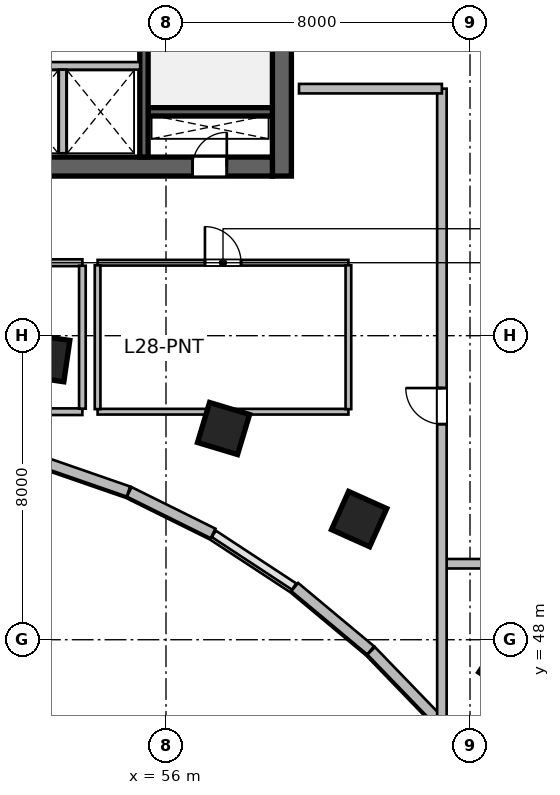
"""IFC4 building model, lengths in metres.
Left out: names, types, materials, properties, quantities, classifications, styles, units other than length and angle.
Written with IfcOpenShell. Run it as: python <this file> out.ifc"""

import sys

from ifc_helpers import new_model, si_unit, direction, frame, frame_2d, origin, origin_2d, place, context, subcontext, project, spatial, rectangle, extrude, source, transform, mapped, element, fill, save


model = new_model("IFC4")
c1 = context("Model", 3, precision=1e-05, world=origin(), true_north=direction((0.0, 1.0)))
c2 = subcontext(c1, "Body", "Model", "MODEL_VIEW")
j1 = project(units=[si_unit("LENGTHUNIT", "METRE"), si_unit("PLANEANGLEUNIT", "RADIAN")], contexts=[c1])
p1 = place(None, origin())
s1 = spatial("IfcSite", under=j1, at=p1, CompositionType="ELEMENT")
p2 = place(p1, origin())
s2 = spatial("IfcBuilding", under=s1, at=p2, CompositionType="ELEMENT")
p3 = place(p2, frame((0.0, 0.0, 119.4)))
s3 = spatial("IfcBuildingStorey", under=s2, at=p3, CompositionType="ELEMENT", Elevation=119.4)
m1 = source(origin(), c2, "Body", "SweptSolid", [
    extrude(rectangle(XDim=12.0, YDim=0.5, at=frame_2d((6.0, 0.0))), origin(), (0.0, 0.0, 1.0), 3.9),
])
p4 = place(p3, frame((59.05, 60.2, 0.0), z_axis=(0.0, 0.0, 1.0), x_axis=(0.0, 1.0, 0.0)))
e1 = element("IfcWall", 1, at=p4, inside=s3, PredefinedType="SHEAR", context=c2, shape_type="MappedRepresentation", body=[
    mapped(m1, transform((0.0, 0.0, 0.0), scale=1.0)),
])
m2 = source(origin(), c2, "Body", "SweptSolid", [
    extrude(rectangle(XDim=21.6, YDim=0.5, at=frame_2d((10.8, 0.0))), origin(), (0.0, 0.0, 1.0), 3.9),
])
p5 = place(p3, frame((37.2, 60.45, 0.0), z_axis=(0.0, 0.0, 1.0), x_axis=(1.0, 0.0, 0.0)))
e2 = element("IfcWall", 2, at=p5, inside=s3, PredefinedType="SHEAR", context=c2, shape_type="MappedRepresentation", body=[
    mapped(m2, transform((0.0, 0.0, 0.0), scale=1.0)),
])
p6 = place(p5, frame((1.1, 0.0, 0.0)))
e3 = element("IfcOpeningElement", 3, at=p6, cuts=e2, PredefinedType="OPENING", context=c2, shape_type="SweptSolid", body=[
    extrude(rectangle(XDim=1.15, YDim=2.15, at=frame_2d((0.575, 1.075))), frame((0.0, 0.26, 0.0), z_axis=(0.0, -1.0, 0.0), x_axis=(1.0, 0.0, 0.0)), (0.0, 0.0, 1.0), 0.52),
])
p7 = place(p5, frame((19.5, 0.0, 0.0)))
e4 = element("IfcOpeningElement", 4, at=p7, cuts=e2, PredefinedType="OPENING", context=c2, shape_type="SweptSolid", body=[
    extrude(rectangle(XDim=0.9, YDim=2.1, at=frame_2d((0.45, 1.05))), frame((0.0, 0.26, 0.0), z_axis=(0.0, -1.0, 0.0), x_axis=(1.0, 0.0, 0.0)), (0.0, 0.0, 1.0), 0.52),
])
p8 = place(p5, frame((12.02, 0.0, 0.0)))
e5 = element("IfcOpeningElement", 5, at=p8, cuts=e2, PredefinedType="OPENING", context=c2, shape_type="SweptSolid", body=[
    extrude(rectangle(XDim=1.6, YDim=2.15, at=frame_2d((0.8, 1.075))), frame((0.0, 0.26, 0.0), z_axis=(0.0, -1.0, 0.0), x_axis=(1.0, 0.0, 0.0)), (0.0, 0.0, 1.0), 0.52),
])
m3 = source(origin(), c2, "Body", "SweptSolid", [
    extrude(rectangle(XDim=3.27, YDim=0.22, at=frame_2d((1.635, 0.0))), origin(), (0.0, 0.0, 1.0), 3.9),
])
p9 = place(p3, frame((55.53, 61.89, 0.0), z_axis=(0.0, 0.0, 1.0), x_axis=(1.0, 0.0, 0.0)))
e6 = element("IfcWall", 6, at=p9, inside=s3, PredefinedType="SHEAR", context=c2, shape_type="MappedRepresentation", body=[
    mapped(m3, transform((0.0, 0.0, 0.0), scale=1.0)),
])
m4 = source(origin(), c2, "Body", "SweptSolid", [
    extrude(rectangle(XDim=11.0, YDim=0.22, at=frame_2d((5.5, 0.0))), origin(), (0.0, 0.0, 1.0), 3.9),
])
p10 = place(p3, frame((55.42, 60.7, 0.0), z_axis=(0.0, 0.0, 1.0), x_axis=(0.0, 1.0, 0.0)))
e7 = element("IfcWall", 7, at=p10, inside=s3, PredefinedType="SHEAR", context=c2, shape_type="MappedRepresentation", body=[
    mapped(m4, transform((0.0, 0.0, 0.0), scale=1.0)),
])
p11 = place(p10, frame((9.545, 0.0, 0.0)))
e8 = element("IfcOpeningElement", 8, at=p11, cuts=e7, PredefinedType="OPENING", context=c2, shape_type="SweptSolid", body=[
    extrude(rectangle(XDim=1.15, YDim=2.15, at=frame_2d((0.575, 1.075))), frame((0.0, 0.12, 0.0), z_axis=(0.0, -1.0, 0.0), x_axis=(1.0, 0.0, 0.0)), (0.0, 0.0, 1.0), 0.24),
])
m5 = source(origin(), c2, "Body", "SweptSolid", [
    extrude(rectangle(XDim=1.1, YDim=1.1, at=origin_2d()), origin(), (0.0, 0.0, 1.0), 3.9),
])
for number, where, z_axis, x_axis in (
    (9, (52.846, 55.411, 0.0), (0.0, 0.0, 1.0), (0.143, 0.99, 0.0)),
    (10, (57.515, 53.558, 0.0), (0.0, 0.0, 1.0), (0.289, 0.957, 0.0)),
    (11, (61.082, 51.175, 0.0), (0.0, 0.0, 1.0), (0.409, 0.912, 0.0)),
    (12, (64.996, 47.294, 0.0), (0.0, 0.0, 1.0), (0.558, 0.83, 0.0)),
):
    element("IfcColumn", number, at=place(p3, frame(where, z_axis=z_axis, x_axis=x_axis)), inside=s3, PredefinedType="COLUMN", context=c2, shape_type="MappedRepresentation", body=[
        mapped(m5, transform((0.0, 0.0, 0.0), scale=1.0)),
    ])
m6 = source(origin(), c2, "Body", "SweptSolid", [
    extrude(rectangle(XDim=2.68, YDim=0.28, at=frame_2d((1.34, 0.0))), origin(), (0.0, 0.0, 1.0), 3.65),
])
p12 = place(p3, frame((63.26, 45.78, 0.0), z_axis=(0.0, 0.0, 1.0), x_axis=(-0.694561996568, 0.719432855049, 0.0)))
e13 = element("IfcWall", 13, at=p12, inside=s3, PredefinedType="SOLIDWALL", context=c2, shape_type="MappedRepresentation", body=[
    mapped(m6, transform((0.0, 0.0, 0.0), scale=1.0)),
])
m7 = source(origin(), c2, "Body", "SweptSolid", [
    extrude(rectangle(XDim=2.601, YDim=0.28, at=frame_2d((1.3, 0.0))), origin(), (0.0, 0.0, 1.0), 3.65),
])
p13 = place(p3, frame((61.385, 47.721, 0.0), z_axis=(0.0, 0.0, 1.0), x_axis=(-0.76796730295, 0.640489048775, 0.0)))
e14 = element("IfcWall", 14, at=p13, inside=s3, PredefinedType="SOLIDWALL", context=c2, shape_type="MappedRepresentation", body=[
    mapped(m7, transform((0.0, 0.0, 0.0), scale=1.0)),
])
m8 = source(origin(), c2, "Body", "SweptSolid", [
    extrude(rectangle(XDim=2.462, YDim=0.28, at=frame_2d((1.231, 0.0))), origin(), (0.0, 0.0, 1.0), 3.65),
])
p14 = place(p3, frame((57.239, 50.797, 0.0), z_axis=(0.0, 0.0, 1.0), x_axis=(-0.8959882207, 0.444077817917, 0.0)))
e15 = element("IfcWall", 15, at=p14, inside=s3, PredefinedType="SOLIDWALL", context=c2, shape_type="MappedRepresentation", body=[
    mapped(m8, transform((0.0, 0.0, 0.0), scale=1.0)),
])
m9 = source(origin(), c2, "Body", "SweptSolid", [
    extrude(rectangle(XDim=2.411, YDim=0.28, at=frame_2d((1.205, 0.0))), origin(), (0.0, 0.0, 1.0), 3.65),
])
p15 = place(p3, frame((55.012, 51.899, 0.0), z_axis=(0.0, 0.0, 1.0), x_axis=(-0.944880068161, 0.327416640982, 0.0)))
e16 = element("IfcWall", 16, at=p15, inside=s3, PredefinedType="SOLIDWALL", context=c2, shape_type="MappedRepresentation", body=[
    mapped(m9, transform((0.0, 0.0, 0.0), scale=1.0)),
])
m10 = source(origin(), c2, "Body", "SweptSolid", [
    extrude(rectangle(XDim=4.1, YDim=0.2, at=frame_2d((2.05, 0.0))), origin(), (0.0, 0.0, 1.0), 3.65),
])
p16 = place(p3, frame((51.22, 63.1, 0.0), z_axis=(0.0, 0.0, 1.0), x_axis=(1.0, 0.0, 0.0)))
e17 = element("IfcWall", 17, at=p16, inside=s3, PredefinedType="SOLIDWALL", context=c2, shape_type="MappedRepresentation", body=[
    mapped(m10, transform((0.0, 0.0, 0.0), scale=1.0)),
])
m11 = source(origin(), c2, "Body", "SweptSolid", [
    extrude(rectangle(XDim=2.2, YDim=0.2, at=frame_2d((1.1, 0.0))), origin(), (0.0, 0.0, 1.0), 3.65),
])
p17 = place(p3, frame((53.28, 60.8, 0.0), z_axis=(0.0, 0.0, 1.0), x_axis=(0.0, 1.0, 0.0)))
e18 = element("IfcWall", 18, at=p17, inside=s3, PredefinedType="SOLIDWALL", context=c2, shape_type="MappedRepresentation", body=[
    mapped(m11, transform((0.0, 0.0, 0.0), scale=1.0)),
])
m12 = source(origin(), c2, "Body", "SweptSolid", [
    extrude(rectangle(XDim=3.248, YDim=0.175, at=frame_2d((1.624, 0.0))), origin(), (0.0, 0.0, 1.0), 3.65),
])
p18 = place(p3, frame((50.552, 54.0, 0.0), z_axis=(0.0, 0.0, 1.0), x_axis=(1.0, 0.0, 0.0)))
e19 = element("IfcWall", 19, at=p18, inside=s3, PredefinedType="PARTITIONING", context=c2, shape_type="MappedRepresentation", body=[
    mapped(m12, transform((0.0, 0.0, 0.0), scale=1.0)),
])
m13 = source(origin(), c2, "Body", "SweptSolid", [
    extrude(rectangle(XDim=3.248, YDim=0.18, at=frame_2d((1.624, 0.0))), origin(), (0.0, 0.0, 1.0), 3.65),
])
p19 = place(p3, frame((50.552, 57.92, 0.0), z_axis=(0.0, 0.0, 1.0), x_axis=(1.0, 0.0, 0.0)))
e20 = element("IfcWall", 20, at=p19, inside=s3, PredefinedType="PLUMBINGWALL", context=c2, shape_type="MappedRepresentation", body=[
    mapped(m13, transform((0.0, 0.0, 0.0), scale=1.0)),
])
p20 = place(p19, frame((1.149, 0.0, 0.0)))
e21 = element("IfcOpeningElement", 21, at=p20, cuts=e20, PredefinedType="OPENING", context=c2, shape_type="SweptSolid", body=[
    extrude(rectangle(XDim=0.95, YDim=2.12, at=frame_2d((0.475, 1.06))), frame((0.0, 0.1, 0.0), z_axis=(0.0, -1.0, 0.0), x_axis=(1.0, 0.0, 0.0)), (0.0, 0.0, 1.0), 0.2),
])
m14 = source(origin(), c2, "Body", "SweptSolid", [
    extrude(rectangle(XDim=3.763, YDim=0.175, at=frame_2d((1.881, 0.0))), origin(), (0.0, 0.0, 1.0), 3.65),
])
p21 = place(p3, frame((53.8, 54.079, 0.0), z_axis=(0.0, 0.0, 1.0), x_axis=(0.0, 1.0, 0.0)))
e22 = element("IfcWall", 22, at=p21, inside=s3, PredefinedType="PARTITIONING", context=c2, shape_type="MappedRepresentation", body=[
    mapped(m14, transform((0.0, 0.0, 0.0), scale=1.0)),
])
m15 = source(origin(), c2, "Body", "SweptSolid", [
    extrude(rectangle(XDim=6.6, YDim=0.15, at=frame_2d((3.3, 0.0))), origin(), (0.0, 0.0, 1.0), 3.095),
])
p22 = place(p3, frame((54.2, 54.0, 0.0), z_axis=(0.0, 0.0, 1.0), x_axis=(1.0, 0.0, 0.0)))
e23 = element("IfcWall", 23, at=p22, inside=s3, PredefinedType="PARTITIONING", context=c2, shape_type="MappedRepresentation", body=[
    mapped(m15, transform((0.0, 0.0, 0.0), scale=1.0)),
])
m16 = source(origin(), c2, "Body", "SweptSolid", [
    extrude(rectangle(XDim=6.6, YDim=0.15, at=frame_2d((3.3, 0.0))), origin(), (0.0, 0.0, 1.0), 3.65),
])
p23 = place(p3, frame((54.2, 57.92, 0.0), z_axis=(0.0, 0.0, 1.0), x_axis=(1.0, 0.0, 0.0)))
e24 = element("IfcWall", 24, at=p23, inside=s3, PredefinedType="PARTITIONING", context=c2, shape_type="MappedRepresentation", body=[
    mapped(m16, transform((0.0, 0.0, 0.0), scale=1.0)),
])
p24 = place(p23, frame((2.825, 0.0, 0.0)))
e25 = element("IfcOpeningElement", 25, at=p24, cuts=e24, PredefinedType="OPENING", context=c2, shape_type="SweptSolid", body=[
    extrude(rectangle(XDim=0.95, YDim=2.1, at=frame_2d((0.475, 1.05))), frame((0.0, 0.085, 0.0), z_axis=(0.0, -1.0, 0.0), x_axis=(1.0, 0.0, 0.0)), (0.0, 0.0, 1.0), 0.17),
])
m17 = source(origin(), c2, "Body", "SweptSolid", [
    extrude(rectangle(XDim=3.785, YDim=0.15, at=frame_2d((1.893, 0.0))), origin(), (0.0, 0.0, 1.0), 3.65),
])
for number, where, z_axis, x_axis in (
    (26, (54.2, 54.067, 0.0), (0.0, 0.0, 1.0), (0.0, 1.0, 0.0)),
    (27, (60.8, 54.067, 0.0), (0.0, 0.0, 1.0), (0.0, 1.0, 0.0)),
):
    element("IfcWall", number, at=place(p3, frame(where, z_axis=z_axis, x_axis=x_axis)), inside=s3, PredefinedType="PARTITIONING", context=c2, shape_type="MappedRepresentation", body=[
        mapped(m17, transform((0.0, 0.0, 0.0), scale=1.0)),
    ])
m18 = source(origin(), c2, "Body", "SweptSolid", [
    extrude(rectangle(XDim=2.5, YDim=0.25, at=frame_2d((1.25, 0.0))), origin(), (0.0, 0.0, 1.0), 3.65),
])
p25 = place(p3, frame((63.3, 50.0, 0.0), z_axis=(0.0, 0.0, 1.0), x_axis=(1.0, 0.0, 0.0)))
e28 = element("IfcWall", 28, at=p25, inside=s3, PredefinedType="PARTITIONING", context=c2, shape_type="MappedRepresentation", body=[
    mapped(m18, transform((0.0, 0.0, 0.0), scale=1.0)),
])
m19 = source(origin(), c2, "Body", "SweptSolid", [
    extrude(rectangle(XDim=16.706, YDim=0.25, at=frame_2d((8.353, 0.0))), origin(), (0.0, 0.0, 1.0), 2.942),
])
p26 = place(p3, frame((63.26, 45.794, 0.0), z_axis=(0.0, 0.0, 1.0), x_axis=(0.0, 1.0, 0.0)))
e29 = element("IfcWall", 29, at=p26, inside=s3, PredefinedType="PARTITIONING", context=c2, shape_type="MappedRepresentation", body=[
    mapped(m19, transform((0.0, 0.0, 0.0), scale=1.0)),
])
p27 = place(p26, frame((7.878, 0.0, 0.0)))
e30 = element("IfcOpeningElement", 30, at=p27, cuts=e29, PredefinedType="OPENING", context=c2, shape_type="SweptSolid", body=[
    extrude(rectangle(XDim=0.95, YDim=2.1, at=frame_2d((0.475, 1.05))), frame((0.0, 0.135, 0.0), z_axis=(0.0, -1.0, 0.0), x_axis=(1.0, 0.0, 0.0)), (0.0, 0.0, 1.0), 0.27),
])
m20 = source(origin(), c2, "Body", "SweptSolid", [
    extrude(rectangle(XDim=3.76, YDim=0.25, at=frame_2d((1.88, 0.0))), origin(), (0.0, 0.0, 1.0), 3.65),
])
p28 = place(p3, frame((59.5, 62.5, 0.0), z_axis=(0.0, 0.0, 1.0), x_axis=(1.0, 0.0, 0.0)))
e31 = element("IfcWall", 31, at=p28, inside=s3, PredefinedType="PARTITIONING", context=c2, shape_type="MappedRepresentation", body=[
    mapped(m20, transform((0.0, 0.0, 0.0), scale=1.0)),
])
m21 = source(origin(), c2, "Body", "SweptSolid", [
    extrude(rectangle(XDim=0.9, YDim=2.1, at=frame_2d((0.45, 1.05))), frame((0.0, 0.025, 0.0), z_axis=(0.0, -1.0, 0.0), x_axis=(1.0, 0.0, 0.0)), (0.0, 0.0, 1.0), 0.05),
])
p29 = place(p7, origin())
e32 = element("IfcDoor", 32, at=p29, inside=s3, OperationType="SINGLE_SWING_RIGHT", PredefinedType="DOOR", context=c2, shape_type="MappedRepresentation", body=[
    mapped(m21, transform((0.0, 0.0, 0.0), scale=1.0)),
])
fill(e4, e32)
m22 = source(origin(), c2, "Body", "SweptSolid", [
    extrude(rectangle(XDim=0.95, YDim=2.1, at=frame_2d((0.475, 1.05))), frame((0.0, 0.025, 0.0), z_axis=(0.0, -1.0, 0.0), x_axis=(1.0, 0.0, 0.0)), (0.0, 0.0, 1.0), 0.05),
])
p30 = place(p24, origin())
e33 = element("IfcDoor", 33, at=p30, inside=s3, OperationType="SINGLE_SWING_LEFT", PredefinedType="DOOR", context=c2, shape_type="MappedRepresentation", body=[
    mapped(m22, transform((0.0, 0.0, 0.0), scale=1.0)),
])
fill(e25, e33)
p31 = place(p27, origin())
e34 = element("IfcDoor", 34, at=p31, inside=s3, OperationType="SINGLE_SWING_RIGHT", PredefinedType="DOOR", context=c2, shape_type="MappedRepresentation", body=[
    mapped(m22, transform((0.0, 0.0, 0.0), scale=1.0)),
])
fill(e30, e34)
save(model, sys.argv[1])
